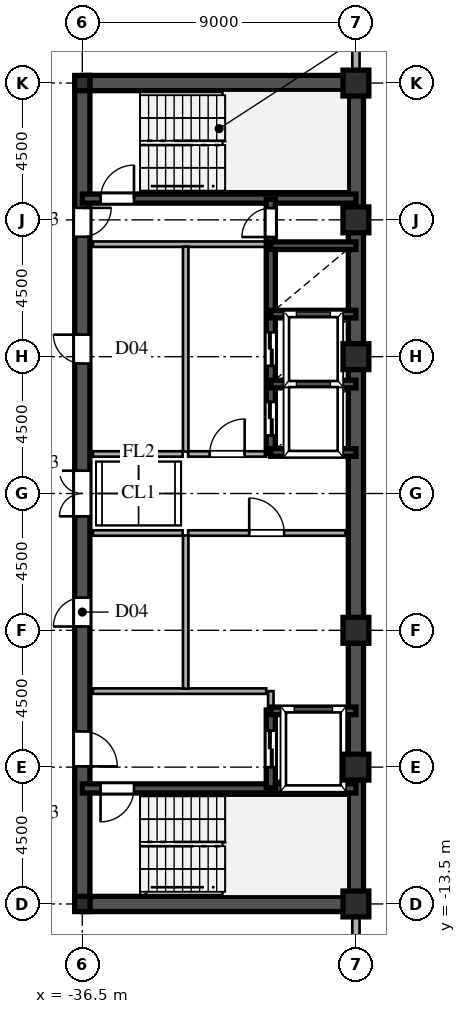
"""IFC4 building model, lengths in metres.
Left out: names, types, materials, properties, quantities, classifications, styles, units other than length and angle.
Written with IfcOpenShell. Run it as: python <this file> out.ifc"""

import sys

from ifc_helpers import new_model, si_unit, direction, frame, frame_2d, origin, origin_2d, place, context, subcontext, project, spatial, rectangle, hollow_rectangle, i_section, extrude, source, transform, mapped, element, fill, save


model = new_model("IFC4")
c1 = context("Model", 3, precision=1e-05, world=origin(), true_north=direction((0.0, 1.0)))
c2 = subcontext(c1, "Body", "Model", "MODEL_VIEW")
j1 = project(units=[si_unit("LENGTHUNIT", "METRE"), si_unit("PLANEANGLEUNIT", "RADIAN")], contexts=[c1])
p1 = place(None, origin())
s1 = spatial("IfcSite", under=j1, at=p1, CompositionType="ELEMENT")
p2 = place(p1, origin())
s2 = spatial("IfcBuilding", under=s1, at=p2, CompositionType="ELEMENT")
p3 = place(p2, frame((0.0, 0.0, 217.5)))
s3 = spatial("IfcBuildingStorey", under=s2, at=p3, CompositionType="ELEMENT", Elevation=217.5)
m1 = source(origin(), c2, "Body", "SweptSolid", [
    extrude(hollow_rectangle(XDim=0.85, YDim=0.85, WallThickness=0.036, at=origin_2d()), origin(), (0.0, 0.0, 1.0), 3.6),
])
for number, where, z_axis, x_axis in (
    (1, (-27.5, -13.5, 0.0), (0.0, 0.0, 1.0), (1.0, 0.0, 0.0)),
    (2, (-27.5, -9.0, 0.0), (0.0, 0.0, 1.0), (1.0, 0.0, 0.0)),
    (3, (-27.5, -4.5, 0.0), (0.0, 0.0, 1.0), (1.0, 0.0, 0.0)),
    (4, (-27.5, 4.5, 0.0), (0.0, 0.0, 1.0), (1.0, 0.0, 0.0)),
    (5, (-27.5, 9.0, 0.0), (0.0, 0.0, 1.0), (1.0, 0.0, 0.0)),
    (6, (-27.5, 13.5, 0.0), (0.0, 0.0, 1.0), (1.0, 0.0, 0.0)),
):
    element("IfcColumn", number, at=place(p3, frame(where, z_axis=z_axis, x_axis=x_axis)), inside=s3, PredefinedType="COLUMN", context=c2, shape_type="MappedRepresentation", body=[
        mapped(m1, transform((0.0, 0.0, 0.0), scale=1.0)),
    ])
m2 = source(origin(), c2, "Body", "SweptSolid", [
    extrude(i_section(OverallWidth=0.5, OverallDepth=0.5, WebThickness=0.02, FlangeThickness=0.032, at=origin_2d()), origin(), (0.0, 0.0, 1.0), 3.6),
])
for number, where, z_axis, x_axis in (
    (7, (-36.5, -13.5, 0.0), (0.0, 0.0, 1.0), (1.0, 0.0, 0.0)),
    (8, (-36.5, 13.5, 0.0), (0.0, 0.0, 1.0), (1.0, 0.0, 0.0)),
):
    element("IfcColumn", number, at=place(p3, frame(where, z_axis=z_axis, x_axis=x_axis)), inside=s3, PredefinedType="COLUMN", context=c2, shape_type="MappedRepresentation", body=[
        mapped(m2, transform((0.0, 0.0, 0.0), scale=1.0)),
    ])
p4 = place(p3, frame((-27.5, -15.98, 0.0), z_axis=(0.0, 0.0, 1.0), x_axis=(0.0, 1.0, 0.0)))
e9 = element("IfcWall", 9, at=p4, inside=s3, PredefinedType="SOLIDWALL", context=c2, shape_type="SweptSolid", body=[
    extrude(rectangle(XDim=1.605, YDim=0.24, at=frame_2d((0.803, 0.0))), origin(), (0.0, 0.0, 1.0), 3.38),
])
for number, where, z_axis, x_axis in (
    (10, (-27.5, -14.375, 0.0), (0.0, 0.0, 1.0), (0.0, 1.0, 0.0)),
    (11, (-27.5, 13.755, 0.0), (0.0, 0.0, 1.0), (0.0, 1.0, 0.0)),
):
    element("IfcWall", number, at=place(p3, frame(where, z_axis=z_axis, x_axis=x_axis)), inside=s3, PredefinedType="SOLIDWALL", context=c2, shape_type="SweptSolid", body=[
        extrude(rectangle(XDim=0.62, YDim=0.24, at=frame_2d((0.31, 0.0))), origin(), (0.0, 0.0, 1.0), 2.88),
    ])
p5 = place(p3, frame((-27.5, 14.375, 0.0), z_axis=(0.0, 0.0, 1.0), x_axis=(0.0, 1.0, 0.0)))
e12 = element("IfcWall", 12, at=p5, inside=s3, PredefinedType="SOLIDWALL", context=c2, shape_type="SweptSolid", body=[
    extrude(rectangle(XDim=1.605, YDim=0.24, at=frame_2d((0.803, 0.0))), origin(), (0.0, 0.0, 1.0), 3.38),
])
for number, where, z_axis, x_axis in (
    (13, (-27.5, -13.5, 0.0), (0.0, 0.0, 1.0), (0.0, 1.0, 0.0)),
    (14, (-27.5, 1.3, 0.0), (0.0, 0.0, 1.0), (0.0, 1.0, 0.0)),
):
    element("IfcWall", number, at=place(p3, frame(where, z_axis=z_axis, x_axis=x_axis)), inside=s3, PredefinedType="SHEAR", context=c2, shape_type="SweptSolid", body=[
        extrude(rectangle(XDim=12.2, YDim=0.5, at=frame_2d((6.1, 0.0))), origin(), (0.0, 0.0, 1.0), 3.38),
    ])
p6 = place(p3, frame((-27.5, -1.3, 0.0), z_axis=(0.0, 0.0, 1.0), x_axis=(0.0, 1.0, 0.0)))
e15 = element("IfcWall", 15, at=p6, inside=s3, PredefinedType="SHEAR", context=c2, shape_type="SweptSolid", body=[
    extrude(rectangle(XDim=2.6, YDim=0.5, at=frame_2d((1.3, 0.0))), origin(), (0.0, 0.0, 1.0), 3.38),
])
for number, where, z_axis, x_axis in (
    (16, (-36.5, -13.5, 0.0), (0.0, 0.0, 1.0), (1.0, 0.0, 0.0)),
    (17, (-36.5, 13.5, 0.0), (0.0, 0.0, 1.0), (1.0, 0.0, 0.0)),
):
    element("IfcWall", number, at=place(p3, frame(where, z_axis=z_axis, x_axis=x_axis)), inside=s3, PredefinedType="SHEAR", context=c2, shape_type="SweptSolid", body=[
        extrude(rectangle(XDim=9.0, YDim=0.5, at=frame_2d((4.5, 0.0))), origin(), (0.0, 0.0, 1.0), 3.38),
    ])
p7 = place(p3, frame((-36.5, -13.65, 0.0), z_axis=(0.0, 0.0, 1.0), x_axis=(0.0, 1.0, 0.0)))
e18 = element("IfcWall", 18, at=p7, inside=s3, PredefinedType="SHEAR", context=c2, shape_type="SweptSolid", body=[
    extrude(rectangle(XDim=7.15, YDim=0.5, at=frame_2d((3.575, 0.0))), origin(), (0.0, 0.0, 1.0), 3.38),
])
p8 = place(p7, frame((4.675, 0.0, 0.0)))
e19 = element("IfcOpeningElement", 19, at=p8, cuts=e18, PredefinedType="OPENING", context=c2, shape_type="SweptSolid", body=[
    extrude(rectangle(XDim=1.15, YDim=2.2, at=frame_2d((0.575, 1.1))), frame((0.0, 0.26, 0.0), z_axis=(0.0, -1.0, 0.0), x_axis=(1.0, 0.0, 0.0)), (0.0, 0.0, 1.0), 0.52),
])
p9 = place(p3, frame((-36.5, -1.3, 0.0), z_axis=(0.0, 0.0, 1.0), x_axis=(0.0, 1.0, 0.0)))
e20 = element("IfcWall", 20, at=p9, inside=s3, PredefinedType="SHEAR", context=c2, shape_type="SweptSolid", body=[
    extrude(rectangle(XDim=2.6, YDim=0.5, at=frame_2d((1.3, 0.0))), origin(), (0.0, 0.0, 1.0), 3.38),
])
p10 = place(p9, frame((0.55, 0.0, 0.0)))
e21 = element("IfcOpeningElement", 21, at=p10, cuts=e20, PredefinedType="OPENING", context=c2, shape_type="SweptSolid", body=[
    extrude(rectangle(XDim=1.5, YDim=2.3, at=frame_2d((0.75, 1.15))), frame((0.0, 0.26, 0.0), z_axis=(0.0, -1.0, 0.0), x_axis=(1.0, 0.0, 0.0)), (0.0, 0.0, 1.0), 0.52),
])
p11 = place(p3, frame((-36.5, 8.2, 0.0), z_axis=(0.0, 0.0, 1.0), x_axis=(0.0, 1.0, 0.0)))
e22 = element("IfcWall", 22, at=p11, inside=s3, PredefinedType="SHEAR", context=c2, shape_type="SweptSolid", body=[
    extrude(rectangle(XDim=5.45, YDim=0.5, at=frame_2d((2.725, 0.0))), origin(), (0.0, 0.0, 1.0), 3.38),
])
p12 = place(p11, frame((0.245, 0.0, 0.0)))
e23 = element("IfcOpeningElement", 23, at=p12, cuts=e22, PredefinedType="OPENING", context=c2, shape_type="SweptSolid", body=[
    extrude(rectangle(XDim=0.95, YDim=2.15, at=frame_2d((0.475, 1.075))), frame((0.0, 0.26, 0.0), z_axis=(0.0, -1.0, 0.0), x_axis=(1.0, 0.0, 0.0)), (0.0, 0.0, 1.0), 0.52),
])
p13 = place(p3, frame((-36.5, -6.5, 0.0), z_axis=(0.0, 0.0, 1.0), x_axis=(0.0, 1.0, 0.0)))
e24 = element("IfcWall", 24, at=p13, inside=s3, PredefinedType="SHEAR", context=c2, shape_type="SweptSolid", body=[
    extrude(rectangle(XDim=5.2, YDim=0.5, at=frame_2d((2.6, 0.0))), origin(), (0.0, 0.0, 1.0), 3.38),
])
p14 = place(p13, frame((2.125, 0.0, 0.0)))
e25 = element("IfcOpeningElement", 25, at=p14, cuts=e24, PredefinedType="OPENING", context=c2, shape_type="SweptSolid", body=[
    extrude(rectangle(XDim=0.95, YDim=2.15, at=frame_2d((0.475, 1.075))), frame((0.0, 0.26, 0.0), z_axis=(0.0, -1.0, 0.0), x_axis=(1.0, 0.0, 0.0)), (0.0, 0.0, 1.0), 0.52),
])
p15 = place(p3, frame((-36.5, 1.3, 0.0), z_axis=(0.0, 0.0, 1.0), x_axis=(0.0, 1.0, 0.0)))
e26 = element("IfcWall", 26, at=p15, inside=s3, PredefinedType="SHEAR", context=c2, shape_type="SweptSolid", body=[
    extrude(rectangle(XDim=6.9, YDim=0.5, at=frame_2d((3.45, 0.0))), origin(), (0.0, 0.0, 1.0), 3.38),
])
p16 = place(p15, frame((2.975, 0.0, 0.0)))
e27 = element("IfcOpeningElement", 27, at=p16, cuts=e26, PredefinedType="OPENING", context=c2, shape_type="SweptSolid", body=[
    extrude(rectangle(XDim=0.95, YDim=2.15, at=frame_2d((0.475, 1.075))), frame((0.0, 0.26, 0.0), z_axis=(0.0, -1.0, 0.0), x_axis=(1.0, 0.0, 0.0)), (0.0, 0.0, 1.0), 0.52),
])
p17 = place(p3, frame((-36.5, -9.7, 0.0), z_axis=(0.0, 0.0, 1.0), x_axis=(1.0, 0.0, 0.0)))
e28 = element("IfcWall", 28, at=p17, inside=s3, PredefinedType="SHEAR", context=c2, shape_type="SweptSolid", body=[
    extrude(rectangle(XDim=9.0, YDim=0.3, at=frame_2d((4.5, 0.0))), origin(), (0.0, 0.0, 1.0), 3.38),
])
p18 = place(p17, frame((0.6, 0.0, 0.0)))
e29 = element("IfcOpeningElement", 29, at=p18, cuts=e28, PredefinedType="OPENING", context=c2, shape_type="SweptSolid", body=[
    extrude(rectangle(XDim=1.1, YDim=2.2, at=frame_2d((0.55, 1.1))), frame((0.0, 0.16, 0.0), z_axis=(0.0, -1.0, 0.0), x_axis=(1.0, 0.0, 0.0)), (0.0, 0.0, 1.0), 0.32),
])
p19 = place(p3, frame((-36.5, 9.7, 0.0), z_axis=(0.0, 0.0, 1.0), x_axis=(1.0, 0.0, 0.0)))
e30 = element("IfcWall", 30, at=p19, inside=s3, PredefinedType="SHEAR", context=c2, shape_type="SweptSolid", body=[
    extrude(rectangle(XDim=9.0, YDim=0.3, at=frame_2d((4.5, 0.0))), origin(), (0.0, 0.0, 1.0), 3.38),
])
p20 = place(p19, frame((0.6, 0.0, 0.0)))
e31 = element("IfcOpeningElement", 31, at=p20, cuts=e30, PredefinedType="OPENING", context=c2, shape_type="SweptSolid", body=[
    extrude(rectangle(XDim=1.1, YDim=2.2, at=frame_2d((0.55, 1.1))), frame((0.0, 0.16, 0.0), z_axis=(0.0, -1.0, 0.0), x_axis=(1.0, 0.0, 0.0)), (0.0, 0.0, 1.0), 0.32),
])
for number, where, z_axis, x_axis in (
    (32, (-30.3, -7.15, 0.0), (0.0, 0.0, 1.0), (1.0, 0.0, 0.0)),
    (33, (-30.3, 1.35, 0.0), (0.0, 0.0, 1.0), (1.0, 0.0, 0.0)),
    (34, (-30.3, 3.6, 0.0), (0.0, 0.0, 1.0), (1.0, 0.0, 0.0)),
    (35, (-30.3, 5.9, 0.0), (0.0, 0.0, 1.0), (1.0, 0.0, 0.0)),
    (36, (-30.3, 8.15, 0.0), (0.0, 0.0, 1.0), (1.0, 0.0, 0.0)),
):
    element("IfcWall", number, at=place(p3, frame(where, z_axis=z_axis, x_axis=x_axis)), inside=s3, PredefinedType="SHEAR", context=c2, shape_type="SweptSolid", body=[
        extrude(rectangle(XDim=2.8, YDim=0.25, at=frame_2d((1.4, 0.0))), origin(), (0.0, 0.0, 1.0), 3.38),
    ])
p21 = place(p3, frame((-30.3, -9.68, 0.0), z_axis=(0.0, 0.0, 1.0), x_axis=(0.0, 1.0, 0.0)))
e37 = element("IfcWall", 37, at=p21, inside=s3, PredefinedType="SHEAR", context=c2, shape_type="SweptSolid", body=[
    extrude(rectangle(XDim=2.56, YDim=0.3, at=frame_2d((1.28, 0.0))), origin(), (0.0, 0.0, 1.0), 3.38),
])
p22 = place(p21, frame((0.68, 0.0, 0.0)))
e38 = element("IfcOpeningElement", 38, at=p22, cuts=e37, PredefinedType="OPENING", context=c2, shape_type="SweptSolid", body=[
    extrude(rectangle(XDim=1.2, YDim=2.25, at=frame_2d((0.6, 1.125))), frame((0.0, 0.16, 0.0), z_axis=(0.0, -1.0, 0.0), x_axis=(1.0, 0.0, 0.0)), (0.0, 0.0, 1.0), 0.32),
])
p23 = place(p3, frame((-30.3, 1.32, 0.0), z_axis=(0.0, 0.0, 1.0), x_axis=(0.0, 1.0, 0.0)))
e39 = element("IfcWall", 39, at=p23, inside=s3, PredefinedType="SHEAR", context=c2, shape_type="SweptSolid", body=[
    extrude(rectangle(XDim=2.28, YDim=0.3, at=frame_2d((1.14, 0.0))), origin(), (0.0, 0.0, 1.0), 3.38),
])
p24 = place(p23, frame((0.59, 0.0, 0.0)))
e40 = element("IfcOpeningElement", 40, at=p24, cuts=e39, PredefinedType="OPENING", context=c2, shape_type="SweptSolid", body=[
    extrude(rectangle(XDim=1.1, YDim=2.2, at=frame_2d((0.55, 1.1))), frame((0.0, 0.16, 0.0), z_axis=(0.0, -1.0, 0.0), x_axis=(1.0, 0.0, 0.0)), (0.0, 0.0, 1.0), 0.32),
])
p25 = place(p3, frame((-30.3, 3.6, 0.0), z_axis=(0.0, 0.0, 1.0), x_axis=(0.0, 1.0, 0.0)))
e41 = element("IfcWall", 41, at=p25, inside=s3, PredefinedType="SHEAR", context=c2, shape_type="SweptSolid", body=[
    extrude(rectangle(XDim=2.3, YDim=0.3, at=frame_2d((1.15, 0.0))), origin(), (0.0, 0.0, 1.0), 3.38),
])
p26 = place(p25, frame((0.6, 0.0, 0.0)))
e42 = element("IfcOpeningElement", 42, at=p26, cuts=e41, PredefinedType="OPENING", context=c2, shape_type="SweptSolid", body=[
    extrude(rectangle(XDim=1.1, YDim=2.2, at=frame_2d((0.55, 1.1))), frame((0.0, 0.16, 0.0), z_axis=(0.0, -1.0, 0.0), x_axis=(1.0, 0.0, 0.0)), (0.0, 0.0, 1.0), 0.32),
])
p27 = place(p3, frame((-30.3, 5.9, 0.0), z_axis=(0.0, 0.0, 1.0), x_axis=(0.0, 1.0, 0.0)))
e43 = element("IfcWall", 43, at=p27, inside=s3, PredefinedType="SHEAR", context=c2, shape_type="SweptSolid", body=[
    extrude(rectangle(XDim=2.25, YDim=0.3, at=frame_2d((1.125, 0.0))), origin(), (0.0, 0.0, 1.0), 3.38),
])
p28 = place(p3, frame((-30.3, 8.15, 0.0), z_axis=(0.0, 0.0, 1.0), x_axis=(0.0, 1.0, 0.0)))
e44 = element("IfcWall", 44, at=p28, inside=s3, PredefinedType="SHEAR", context=c2, shape_type="SweptSolid", body=[
    extrude(rectangle(XDim=1.53, YDim=0.3, at=frame_2d((0.765, 0.0))), origin(), (0.0, 0.0, 1.0), 3.38),
])
p29 = place(p28, frame((0.285, 0.0, 0.0)))
e45 = element("IfcOpeningElement", 45, at=p29, cuts=e44, PredefinedType="OPENING", context=c2, shape_type="SweptSolid", body=[
    extrude(rectangle(XDim=0.95, YDim=2.15, at=frame_2d((0.475, 1.075))), frame((0.0, 0.16, 0.0), z_axis=(0.0, -1.0, 0.0), x_axis=(1.0, 0.0, 0.0)), (0.0, 0.0, 1.0), 0.32),
])
p30 = place(p3, frame((-36.15, -6.5, 0.0), z_axis=(0.0, 0.0, 1.0), x_axis=(1.0, 0.0, 0.0)))
e46 = element("IfcWall", 46, at=p30, inside=s3, PredefinedType="PARTITIONING", context=c2, shape_type="SweptSolid", body=[
    extrude(rectangle(XDim=5.7, YDim=0.18, at=frame_2d((2.85, 0.0))), origin(), (0.0, 0.0, 1.0), 3.38),
])
p31 = place(p3, frame((-30.3, -7.12, 0.0), z_axis=(0.0, 0.0, 1.0), x_axis=(0.0, 1.0, 0.0)))
e47 = element("IfcWall", 47, at=p31, inside=s3, PredefinedType="PARTITIONING", context=c2, shape_type="SweptSolid", body=[
    extrude(rectangle(XDim=0.62, YDim=0.18, at=frame_2d((0.31, 0.0))), origin(), (0.0, 0.0, 1.0), 3.38),
])
p32 = place(p3, frame((-36.15, 8.2, 0.0), z_axis=(0.0, 0.0, 1.0), x_axis=(1.0, 0.0, 0.0)))
e48 = element("IfcWall", 48, at=p32, inside=s3, PredefinedType="PARTITIONING", context=c2, shape_type="SweptSolid", body=[
    extrude(rectangle(XDim=5.7, YDim=0.18, at=frame_2d((2.85, 0.0))), origin(), (0.0, 0.0, 1.0), 3.38),
])
p33 = place(p3, frame((-33.1, -6.42, 0.0), z_axis=(0.0, 0.0, 1.0), x_axis=(0.0, 1.0, 0.0)))
e49 = element("IfcWall", 49, at=p33, inside=s3, PredefinedType="PARTITIONING", context=c2, shape_type="SweptSolid", body=[
    extrude(rectangle(XDim=5.04, YDim=0.18, at=frame_2d((2.52, 0.0))), origin(), (0.0, 0.0, 1.0), 3.38),
])
p34 = place(p3, frame((-33.1, 1.38, 0.0), z_axis=(0.0, 0.0, 1.0), x_axis=(0.0, 1.0, 0.0)))
e50 = element("IfcWall", 50, at=p34, inside=s3, PredefinedType="PARTITIONING", context=c2, shape_type="SweptSolid", body=[
    extrude(rectangle(XDim=6.74, YDim=0.18, at=frame_2d((3.37, 0.0))), origin(), (0.0, 0.0, 1.0), 3.38),
])
p35 = place(p3, frame((-33.02, -1.3, 0.0), z_axis=(0.0, 0.0, 1.0), x_axis=(1.0, 0.0, 0.0)))
e51 = element("IfcWall", 51, at=p35, inside=s3, PredefinedType="PARTITIONING", context=c2, shape_type="SweptSolid", body=[
    extrude(rectangle(XDim=5.17, YDim=0.18, at=frame_2d((2.585, 0.0))), origin(), (0.0, 0.0, 1.0), 3.38),
])
p36 = place(p35, frame((2.01, 0.0, 0.0)))
e52 = element("IfcOpeningElement", 52, at=p36, cuts=e51, PredefinedType="OPENING", context=c2, shape_type="SweptSolid", body=[
    extrude(rectangle(XDim=1.15, YDim=2.2, at=frame_2d((0.575, 1.1))), frame((0.0, 0.1, 0.0), z_axis=(0.0, -1.0, 0.0), x_axis=(1.0, 0.0, 0.0)), (0.0, 0.0, 1.0), 0.2),
])
p37 = place(p3, frame((-33.02, 1.3, 0.0), z_axis=(0.0, 0.0, 1.0), x_axis=(1.0, 0.0, 0.0)))
e53 = element("IfcWall", 53, at=p37, inside=s3, PredefinedType="PARTITIONING", context=c2, shape_type="SweptSolid", body=[
    extrude(rectangle(XDim=2.57, YDim=0.18, at=frame_2d((1.285, 0.0))), origin(), (0.0, 0.0, 1.0), 3.38),
])
p38 = place(p37, frame((0.71, 0.0, 0.0)))
e54 = element("IfcOpeningElement", 54, at=p38, cuts=e53, PredefinedType="OPENING", context=c2, shape_type="SweptSolid", body=[
    extrude(rectangle(XDim=1.15, YDim=2.2, at=frame_2d((0.575, 1.1))), frame((0.0, 0.1, 0.0), z_axis=(0.0, -1.0, 0.0), x_axis=(1.0, 0.0, 0.0)), (0.0, 0.0, 1.0), 0.2),
])
for number, where, z_axis, x_axis in (
    (55, (-36.15, -1.3, 0.0), (0.0, 0.0, 1.0), (1.0, 0.0, 0.0)),
    (56, (-36.15, 1.3, 0.0), (0.0, 0.0, 1.0), (1.0, 0.0, 0.0)),
):
    element("IfcWall", number, at=place(p3, frame(where, z_axis=z_axis, x_axis=x_axis)), inside=s3, PredefinedType="PARTITIONING", context=c2, shape_type="SweptSolid", body=[
        extrude(rectangle(XDim=2.95, YDim=0.18, at=frame_2d((1.475, 0.0))), origin(), (0.0, 0.0, 1.0), 3.38),
    ])
m3 = source(origin(), c2, "Body", "SweptSolid", [
    extrude(rectangle(XDim=1.15, YDim=2.2, at=frame_2d((0.575, 1.1))), frame((0.0, 0.025, 0.0), z_axis=(0.0, -1.0, 0.0), x_axis=(1.0, 0.0, 0.0)), (0.0, 0.0, 1.0), 0.05),
])
p39 = place(p8, frame((1.15, 0.0, 0.0), z_axis=(0.0, 0.0, 1.0), x_axis=(-1.0, 0.0, 0.0)))
e57 = element("IfcDoor", 57, at=p39, inside=s3, OperationType="SINGLE_SWING_LEFT", PredefinedType="DOOR", context=c2, shape_type="MappedRepresentation", body=[
    mapped(m3, transform((0.0, 0.0, 0.0), scale=1.0)),
])
fill(e19, e57)
m4 = source(origin(), c2, "Body", "SweptSolid", [
    extrude(rectangle(XDim=1.5, YDim=2.3, at=frame_2d((0.75, 1.15))), frame((0.0, 0.025, 0.0), z_axis=(0.0, -1.0, 0.0), x_axis=(1.0, 0.0, 0.0)), (0.0, 0.0, 1.0), 0.05),
])
p40 = place(p10, origin())
e58 = element("IfcDoor", 58, at=p40, inside=s3, OperationType="DOUBLE_SWING_LEFT", PredefinedType="DOOR", context=c2, shape_type="MappedRepresentation", body=[
    mapped(m4, transform((0.0, 0.0, 0.0), scale=1.0)),
])
fill(e21, e58)
m5 = source(origin(), c2, "Body", "SweptSolid", [
    extrude(rectangle(XDim=0.95, YDim=2.15, at=frame_2d((0.475, 1.075))), frame((0.0, 0.025, 0.0), z_axis=(0.0, -1.0, 0.0), x_axis=(1.0, 0.0, 0.0)), (0.0, 0.0, 1.0), 0.05),
])
p41 = place(p12, frame((0.95, 0.0, 0.0), z_axis=(0.0, 0.0, 1.0), x_axis=(-1.0, 0.0, 0.0)))
e59 = element("IfcDoor", 59, at=p41, inside=s3, OperationType="SINGLE_SWING_RIGHT", PredefinedType="DOOR", context=c2, shape_type="MappedRepresentation", body=[
    mapped(m5, transform((0.0, 0.0, 0.0), scale=1.0)),
])
fill(e23, e59)
p42 = place(p14, origin())
e60 = element("IfcDoor", 60, at=p42, inside=s3, OperationType="SINGLE_SWING_LEFT", PredefinedType="DOOR", context=c2, shape_type="MappedRepresentation", body=[
    mapped(m5, transform((0.0, 0.0, 0.0), scale=1.0)),
])
fill(e25, e60)
p43 = place(p16, origin())
e61 = element("IfcDoor", 61, at=p43, inside=s3, OperationType="SINGLE_SWING_RIGHT", PredefinedType="DOOR", context=c2, shape_type="MappedRepresentation", body=[
    mapped(m5, transform((0.0, 0.0, 0.0), scale=1.0)),
])
fill(e27, e61)
m6 = source(origin(), c2, "Body", "SweptSolid", [
    extrude(rectangle(XDim=1.1, YDim=2.2, at=frame_2d((0.55, 1.1))), frame((0.0, 0.025, 0.0), z_axis=(0.0, -1.0, 0.0), x_axis=(1.0, 0.0, 0.0)), (0.0, 0.0, 1.0), 0.05),
])
p44 = place(p18, frame((1.1, 0.0, 0.0), z_axis=(0.0, 0.0, 1.0), x_axis=(-1.0, 0.0, 0.0)))
e62 = element("IfcDoor", 62, at=p44, inside=s3, OperationType="SINGLE_SWING_LEFT", PredefinedType="DOOR", context=c2, shape_type="MappedRepresentation", body=[
    mapped(m6, transform((0.0, 0.0, 0.0), scale=1.0)),
])
fill(e29, e62)
p45 = place(p20, origin())
e63 = element("IfcDoor", 63, at=p45, inside=s3, OperationType="SINGLE_SWING_RIGHT", PredefinedType="DOOR", context=c2, shape_type="MappedRepresentation", body=[
    mapped(m6, transform((0.0, 0.0, 0.0), scale=1.0)),
])
fill(e31, e63)
m7 = source(origin(), c2, "Body", "SweptSolid", [
    extrude(rectangle(XDim=1.2, YDim=2.25, at=frame_2d((0.6, 1.125))), frame((0.0, 0.025, 0.0), z_axis=(0.0, -1.0, 0.0), x_axis=(1.0, 0.0, 0.0)), (0.0, 0.0, 1.0), 0.05),
])
p46 = place(p22, origin())
e64 = element("IfcDoor", 64, at=p46, inside=s3, OperationType="DOUBLE_DOOR_SLIDING", PredefinedType="DOOR", context=c2, shape_type="MappedRepresentation", body=[
    mapped(m7, transform((0.0, 0.0, 0.0), scale=1.0)),
])
fill(e38, e64)
m8 = source(origin(), c2, "Body", "SweptSolid", [
    extrude(rectangle(XDim=1.1, YDim=2.2, at=frame_2d((0.55, 1.1))), frame((0.0, 0.025, 0.0), z_axis=(0.0, -1.0, 0.0), x_axis=(1.0, 0.0, 0.0)), (0.0, 0.0, 1.0), 0.05),
])
p47 = place(p24, origin())
e65 = element("IfcDoor", 65, at=p47, inside=s3, OperationType="DOUBLE_DOOR_SLIDING", PredefinedType="DOOR", context=c2, shape_type="MappedRepresentation", body=[
    mapped(m8, transform((0.0, 0.0, 0.0), scale=1.0)),
])
fill(e40, e65)
p48 = place(p26, origin())
e66 = element("IfcDoor", 66, at=p48, inside=s3, OperationType="DOUBLE_DOOR_SLIDING", PredefinedType="DOOR", context=c2, shape_type="MappedRepresentation", body=[
    mapped(m8, transform((0.0, 0.0, 0.0), scale=1.0)),
])
fill(e42, e66)
p49 = place(p29, origin())
e67 = element("IfcDoor", 67, at=p49, inside=s3, OperationType="SINGLE_SWING_LEFT", PredefinedType="DOOR", context=c2, shape_type="MappedRepresentation", body=[
    mapped(m5, transform((0.0, 0.0, 0.0), scale=1.0)),
])
fill(e45, e67)
p50 = place(p36, origin())
e68 = element("IfcDoor", 68, at=p50, inside=s3, OperationType="SINGLE_SWING_LEFT", PredefinedType="DOOR", context=c2, shape_type="MappedRepresentation", body=[
    mapped(m3, transform((0.0, 0.0, 0.0), scale=1.0)),
])
fill(e52, e68)
p51 = place(p38, origin())
e69 = element("IfcDoor", 69, at=p51, inside=s3, OperationType="SINGLE_SWING_RIGHT", PredefinedType="DOOR", context=c2, shape_type="MappedRepresentation", body=[
    mapped(m3, transform((0.0, 0.0, 0.0), scale=1.0)),
])
fill(e54, e69)
save(model, sys.argv[1])
